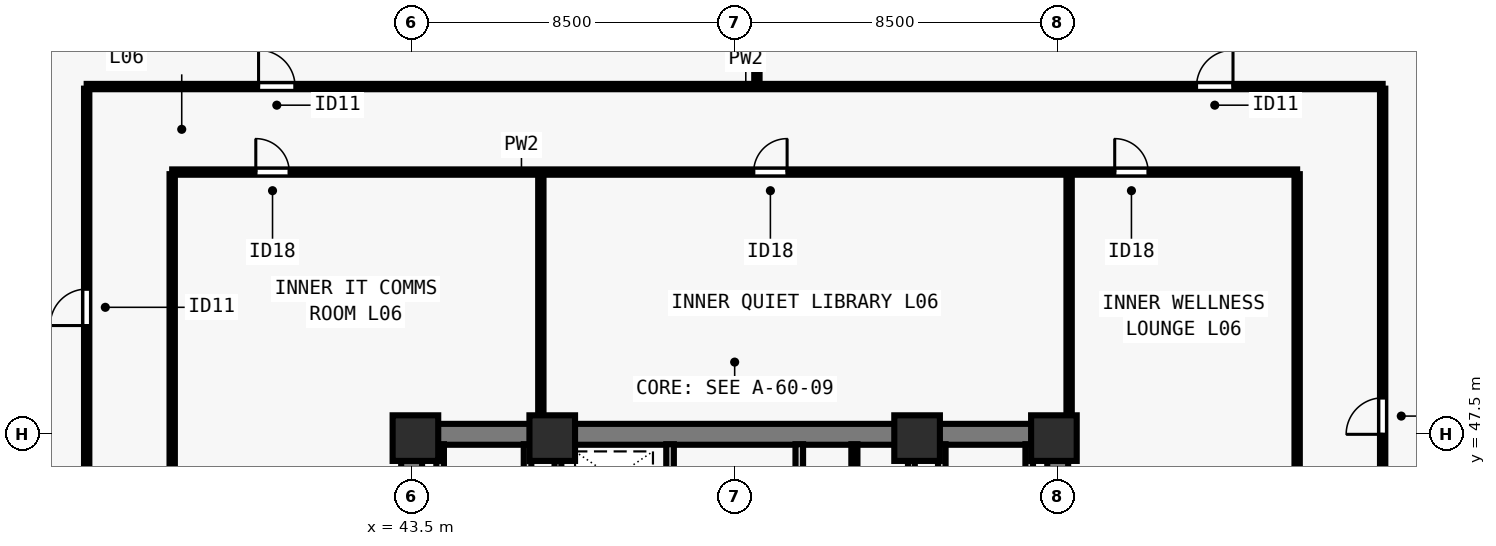
"""IFC4 building model, lengths in metres.
Left out: names, types, materials, properties, quantities, classifications, styles, units other than length and angle.
Written with IfcOpenShell. Run it as: python <this file> out.ifc"""

import sys

from ifc_helpers import new_model, si_unit, direction, frame, frame_2d, origin, origin_2d, place, context, subcontext, project, spatial, rectangle, extrude, element, fill, save


model = new_model("IFC4")
c1 = context("Model", 3, precision=1e-05, world=origin(), true_north=direction((0.0, 1.0)))
c2 = subcontext(c1, "Body", "Model", "MODEL_VIEW")
j1 = project(units=[si_unit("LENGTHUNIT", "METRE"), si_unit("PLANEANGLEUNIT", "RADIAN")], contexts=[c1])
p1 = place(None, origin())
s1 = spatial("IfcSite", under=j1, at=p1, CompositionType="ELEMENT")
p2 = place(p1, origin())
s2 = spatial("IfcBuilding", under=s1, at=p2, CompositionType="ELEMENT")
p3 = place(p2, frame((0.0, 0.0, 27.0)))
s3 = spatial("IfcBuildingStorey", under=s2, at=p3, CompositionType="ELEMENT", Elevation=27.0)
for number, where, z_axis, x_axis in (
    (1, (43.6, 47.4, 0.0), (0.0, 0.0, 1.0), (1.0, 0.0, 0.0)),
    (2, (47.2, 47.4, 0.0), (0.0, 0.0, 1.0), (1.0, 0.0, 0.0)),
    (3, (56.8, 47.4, 0.0), (0.0, 0.0, 1.0), (1.0, 0.0, 0.0)),
    (4, (60.4, 47.4, 0.0), (0.0, 0.0, 1.0), (1.0, 0.0, 0.0)),
):
    element("IfcColumn", number, at=place(p3, frame(where, z_axis=z_axis, x_axis=x_axis)), inside=s3, PredefinedType="COLUMN", context=c2, shape_type="SweptSolid", body=[
        extrude(rectangle(XDim=1.2, YDim=1.2, at=origin_2d()), origin(), (0.0, 0.0, 1.0), 3.5),
    ])
p4 = place(p3, frame((43.225, 47.5, 0.0), z_axis=(0.0, 0.0, 1.0), x_axis=(1.0, 0.0, 0.0)))
e5 = element("IfcWall", 5, at=p4, inside=s3, PredefinedType="SHEAR", context=c2, shape_type="SweptSolid", body=[
    extrude(rectangle(XDim=17.55, YDim=0.55, at=frame_2d((8.775, 0.0))), origin(), (0.0, 0.0, 1.0), 3.28),
])
for number, where, z_axis, x_axis in (
    (6, (43.5, 40.8, 0.0), (0.0, 0.0, 1.0), (0.0, 1.0, 0.0)),
    (7, (60.5, 40.8, 0.0), (0.0, 0.0, 1.0), (0.0, 1.0, 0.0)),
):
    element("IfcWall", number, at=place(p3, frame(where, z_axis=z_axis, x_axis=x_axis)), inside=s3, PredefinedType="SHEAR", context=c2, shape_type="SweptSolid", body=[
        extrude(rectangle(XDim=6.435, YDim=0.55, at=frame_2d((3.218, 0.0))), origin(), (0.0, 0.0, 1.0), 3.28),
    ])
p5 = place(p3, frame((50.3, 40.585, 0.0), z_axis=(0.0, 0.0, 1.0), x_axis=(0.0, 1.0, 0.0)))
e8 = element("IfcWall", 8, at=p5, inside=s3, PredefinedType="SOLIDWALL", context=c2, shape_type="SweptSolid", body=[
    extrude(rectangle(XDim=6.655, YDim=0.2, at=frame_2d((3.328, 0.0))), origin(), (0.0, 0.0, 1.0), 3.28),
])
p6 = place(p5, frame((5.065, 0.0, 0.0)))
e9 = element("IfcOpeningElement", 9, at=p6, cuts=e8, PredefinedType="OPENING", context=c2, shape_type="SweptSolid", body=[
    extrude(rectangle(XDim=0.8, YDim=2.08, at=frame_2d((0.4, 1.04))), frame((0.0, 0.11, 0.0), z_axis=(0.0, -1.0, 0.0), x_axis=(1.0, 0.0, 0.0)), (0.0, 0.0, 1.0), 0.22),
])
p7 = place(p3, frame((53.7, 40.585, 0.0), z_axis=(0.0, 0.0, 1.0), x_axis=(0.0, 1.0, 0.0)))
e10 = element("IfcWall", 10, at=p7, inside=s3, PredefinedType="SOLIDWALL", context=c2, shape_type="SweptSolid", body=[
    extrude(rectangle(XDim=6.655, YDim=0.2, at=frame_2d((3.328, 0.0))), origin(), (0.0, 0.0, 1.0), 3.28),
])
p8 = place(p7, frame((0.195, 0.0, 0.0)))
e11 = element("IfcOpeningElement", 11, at=p8, cuts=e10, PredefinedType="OPENING", context=c2, shape_type="SweptSolid", body=[
    extrude(rectangle(XDim=0.8, YDim=2.08, at=frame_2d((0.4, 1.04))), frame((0.0, 0.11, 0.0), z_axis=(0.0, -1.0, 0.0), x_axis=(1.0, 0.0, 0.0)), (0.0, 0.0, 1.0), 0.22),
])
p9 = place(p7, frame((4.265, 0.0, 0.0)))
e12 = element("IfcOpeningElement", 12, at=p9, cuts=e10, PredefinedType="OPENING", context=c2, shape_type="SweptSolid", body=[
    extrude(rectangle(XDim=0.95, YDim=2.12, at=frame_2d((0.475, 1.06))), frame((0.0, 0.11, 0.0), z_axis=(0.0, -1.0, 0.0), x_axis=(1.0, 0.0, 0.0)), (0.0, 0.0, 1.0), 0.22),
])
for number, where, z_axis, x_axis in (
    (13, (46.55, 43.735, 0.0), (0.0, 0.0, 1.0), (0.0, 1.0, 0.0)),
    (14, (44.25, 43.735, 0.0), (0.0, 0.0, 1.0), (0.0, 1.0, 0.0)),
    (15, (57.45, 43.735, 0.0), (0.0, 0.0, 1.0), (0.0, 1.0, 0.0)),
    (16, (59.75, 43.735, 0.0), (0.0, 0.0, 1.0), (0.0, 1.0, 0.0)),
):
    element("IfcWall", number, at=place(p3, frame(where, z_axis=z_axis, x_axis=x_axis)), inside=s3, PredefinedType="SOLIDWALL", context=c2, shape_type="SweptSolid", body=[
        extrude(rectangle(XDim=3.505, YDim=0.2, at=frame_2d((1.752, 0.0))), origin(), (0.0, 0.0, 1.0), 3.28),
    ])
for number, where, z_axis, x_axis in (
    (17, (47.35, 43.735, 0.0), (0.0, 0.0, 1.0), (0.0, 1.0, 0.0)),
    (18, (56.65, 43.735, 0.0), (0.0, 0.0, 1.0), (0.0, 1.0, 0.0)),
):
    element("IfcWall", number, at=place(p3, frame(where, z_axis=z_axis, x_axis=x_axis)), inside=s3, PredefinedType="SOLIDWALL", context=c2, shape_type="SweptSolid", body=[
        extrude(rectangle(XDim=3.505, YDim=0.18, at=frame_2d((1.752, 0.0))), origin(), (0.0, 0.0, 1.0), 3.28),
    ])
p10 = place(p3, frame((55.15, 44.195, 0.0), z_axis=(0.0, 0.0, 1.0), x_axis=(0.0, 1.0, 0.0)))
e19 = element("IfcWall", 19, at=p10, inside=s3, PredefinedType="PARTITIONING", context=c2, shape_type="SweptSolid", body=[
    extrude(rectangle(XDim=3.045, YDim=0.16, at=frame_2d((1.522, 0.0))), origin(), (0.0, 0.0, 1.0), 3.28),
])
p11 = place(p10, frame((1.025, 0.0, 0.0)))
e20 = element("IfcOpeningElement", 20, at=p11, cuts=e19, PredefinedType="OPENING", context=c2, shape_type="SweptSolid", body=[
    extrude(rectangle(XDim=0.8, YDim=2.1, at=frame_2d((0.4, 1.05))), frame((0.0, 0.09, 0.0), z_axis=(0.0, -1.0, 0.0), x_axis=(1.0, 0.0, 0.0)), (0.0, 0.0, 1.0), 0.18),
])
p12 = place(p3, frame((34.95, 56.65, 0.0), z_axis=(0.0, 0.0, 1.0), x_axis=(1.0, 0.0, 0.0)))
e21 = element("IfcWall", 21, at=p12, inside=s3, PredefinedType="PARTITIONING", context=c2, shape_type="SweptSolid", body=[
    extrude(rectangle(XDim=34.1, YDim=0.14, at=frame_2d((17.05, 0.0))), origin(), (0.0, 0.0, 1.0), 3.28),
])
p13 = place(p12, frame((4.522, 0.0, 0.0)))
e22 = element("IfcOpeningElement", 22, at=p13, cuts=e21, PredefinedType="OPENING", context=c2, shape_type="SweptSolid", body=[
    extrude(rectangle(XDim=0.96, YDim=2.12, at=frame_2d((0.48, 1.06))), frame((0.0, 0.08, 0.0), z_axis=(0.0, -1.0, 0.0), x_axis=(1.0, 0.0, 0.0)), (0.0, 0.0, 1.0), 0.16),
])
p14 = place(p12, frame((29.202, 0.0, 0.0)))
e23 = element("IfcOpeningElement", 23, at=p14, cuts=e21, PredefinedType="OPENING", context=c2, shape_type="SweptSolid", body=[
    extrude(rectangle(XDim=0.96, YDim=2.12, at=frame_2d((0.48, 1.06))), frame((0.0, 0.08, 0.0), z_axis=(0.0, -1.0, 0.0), x_axis=(1.0, 0.0, 0.0)), (0.0, 0.0, 1.0), 0.16),
])
p15 = place(p3, frame((34.95, 21.405, 0.0), z_axis=(0.0, 0.0, 1.0), x_axis=(0.0, 1.0, 0.0)))
e24 = element("IfcWall", 24, at=p15, inside=s3, PredefinedType="PARTITIONING", context=c2, shape_type="SweptSolid", body=[
    extrude(rectangle(XDim=35.19, YDim=0.14, at=frame_2d((17.595, 0.0))), origin(), (0.0, 0.0, 1.0), 3.28),
])
p16 = place(p15, frame((5.21, 0.0, 0.0)))
e25 = element("IfcOpeningElement", 25, at=p16, cuts=e24, PredefinedType="OPENING", context=c2, shape_type="SweptSolid", body=[
    extrude(rectangle(XDim=0.96, YDim=2.12, at=frame_2d((0.48, 1.06))), frame((0.0, 0.08, 0.0), z_axis=(0.0, -1.0, 0.0), x_axis=(1.0, 0.0, 0.0)), (0.0, 0.0, 1.0), 0.16),
])
p17 = place(p15, frame((17.052, 0.0, 0.0)))
e26 = element("IfcOpeningElement", 26, at=p17, cuts=e24, PredefinedType="OPENING", context=c2, shape_type="SweptSolid", body=[
    extrude(rectangle(XDim=0.96, YDim=2.12, at=frame_2d((0.48, 1.06))), frame((0.0, 0.08, 0.0), z_axis=(0.0, -1.0, 0.0), x_axis=(1.0, 0.0, 0.0)), (0.0, 0.0, 1.0), 0.16),
])
p18 = place(p15, frame((28.957, 0.0, 0.0)))
e27 = element("IfcOpeningElement", 27, at=p18, cuts=e24, PredefinedType="OPENING", context=c2, shape_type="SweptSolid", body=[
    extrude(rectangle(XDim=0.96, YDim=2.12, at=frame_2d((0.48, 1.06))), frame((0.0, 0.08, 0.0), z_axis=(0.0, -1.0, 0.0), x_axis=(1.0, 0.0, 0.0)), (0.0, 0.0, 1.0), 0.16),
])
p19 = place(p3, frame((69.05, 21.405, 0.0), z_axis=(0.0, 0.0, 1.0), x_axis=(0.0, 1.0, 0.0)))
e28 = element("IfcWall", 28, at=p19, inside=s3, PredefinedType="PARTITIONING", context=c2, shape_type="SweptSolid", body=[
    extrude(rectangle(XDim=35.19, YDim=0.14, at=frame_2d((17.595, 0.0))), origin(), (0.0, 0.0, 1.0), 3.28),
])
p20 = place(p19, frame((8.545, 0.0, 0.0)))
e29 = element("IfcOpeningElement", 29, at=p20, cuts=e28, PredefinedType="OPENING", context=c2, shape_type="SweptSolid", body=[
    extrude(rectangle(XDim=0.96, YDim=2.12, at=frame_2d((0.48, 1.06))), frame((0.0, 0.08, 0.0), z_axis=(0.0, -1.0, 0.0), x_axis=(1.0, 0.0, 0.0)), (0.0, 0.0, 1.0), 0.16),
])
p21 = place(p19, frame((26.095, 0.0, 0.0)))
e30 = element("IfcOpeningElement", 30, at=p21, cuts=e28, PredefinedType="OPENING", context=c2, shape_type="SweptSolid", body=[
    extrude(rectangle(XDim=0.96, YDim=2.12, at=frame_2d((0.48, 1.06))), frame((0.0, 0.08, 0.0), z_axis=(0.0, -1.0, 0.0), x_axis=(1.0, 0.0, 0.0)), (0.0, 0.0, 1.0), 0.16),
])
p22 = place(p3, frame((37.2, 54.4, 0.0), z_axis=(0.0, 0.0, 1.0), x_axis=(1.0, 0.0, 0.0)))
e31 = element("IfcWall", 31, at=p22, inside=s3, PredefinedType="PARTITIONING", context=c2, shape_type="SweptSolid", body=[
    extrude(rectangle(XDim=29.6, YDim=0.14, at=frame_2d((14.8, 0.0))), origin(), (0.0, 0.0, 1.0), 3.28),
])
p23 = place(p22, frame((2.2, 0.0, 0.0)))
e32 = element("IfcOpeningElement", 32, at=p23, cuts=e31, PredefinedType="OPENING", context=c2, shape_type="SweptSolid", body=[
    extrude(rectangle(XDim=0.88, YDim=2.1, at=frame_2d((0.44, 1.05))), frame((0.0, 0.08, 0.0), z_axis=(0.0, -1.0, 0.0), x_axis=(1.0, 0.0, 0.0)), (0.0, 0.0, 1.0), 0.16),
])
p24 = place(p22, frame((15.3, 0.0, 0.0)))
e33 = element("IfcOpeningElement", 33, at=p24, cuts=e31, PredefinedType="OPENING", context=c2, shape_type="SweptSolid", body=[
    extrude(rectangle(XDim=0.88, YDim=2.1, at=frame_2d((0.44, 1.05))), frame((0.0, 0.08, 0.0), z_axis=(0.0, -1.0, 0.0), x_axis=(1.0, 0.0, 0.0)), (0.0, 0.0, 1.0), 0.16),
])
p25 = place(p22, frame((24.8, 0.0, 0.0)))
e34 = element("IfcOpeningElement", 34, at=p25, cuts=e31, PredefinedType="OPENING", context=c2, shape_type="SweptSolid", body=[
    extrude(rectangle(XDim=0.88, YDim=2.1, at=frame_2d((0.44, 1.05))), frame((0.0, 0.08, 0.0), z_axis=(0.0, -1.0, 0.0), x_axis=(1.0, 0.0, 0.0)), (0.0, 0.0, 1.0), 0.16),
])
p26 = place(p3, frame((37.2, 40.8, 0.0), z_axis=(0.0, 0.0, 1.0), x_axis=(0.0, 1.0, 0.0)))
e35 = element("IfcWall", 35, at=p26, inside=s3, PredefinedType="PARTITIONING", context=c2, shape_type="SweptSolid", body=[
    extrude(rectangle(XDim=13.545, YDim=0.14, at=frame_2d((6.772, 0.0))), origin(), (0.0, 0.0, 1.0), 3.28),
])
p27 = place(p26, frame((2.5, 0.0, 0.0)))
e36 = element("IfcOpeningElement", 36, at=p27, cuts=e35, PredefinedType="OPENING", context=c2, shape_type="SweptSolid", body=[
    extrude(rectangle(XDim=0.88, YDim=2.1, at=frame_2d((0.44, 1.05))), frame((0.0, 0.08, 0.0), z_axis=(0.0, -1.0, 0.0), x_axis=(1.0, 0.0, 0.0)), (0.0, 0.0, 1.0), 0.16),
])
p28 = place(p3, frame((66.8, 40.8, 0.0), z_axis=(0.0, 0.0, 1.0), x_axis=(0.0, 1.0, 0.0)))
e37 = element("IfcWall", 37, at=p28, inside=s3, PredefinedType="PARTITIONING", context=c2, shape_type="SweptSolid", body=[
    extrude(rectangle(XDim=13.545, YDim=0.14, at=frame_2d((6.772, 0.0))), origin(), (0.0, 0.0, 1.0), 3.28),
])
p29 = place(p28, frame((2.5, 0.0, 0.0)))
e38 = element("IfcOpeningElement", 38, at=p29, cuts=e37, PredefinedType="OPENING", context=c2, shape_type="SweptSolid", body=[
    extrude(rectangle(XDim=0.88, YDim=2.1, at=frame_2d((0.44, 1.05))), frame((0.0, 0.08, 0.0), z_axis=(0.0, -1.0, 0.0), x_axis=(1.0, 0.0, 0.0)), (0.0, 0.0, 1.0), 0.16),
])
p30 = place(p3, frame((46.9, 47.76, 0.0), z_axis=(0.0, 0.0, 1.0), x_axis=(0.0, 1.0, 0.0)))
e39 = element("IfcWall", 39, at=p30, inside=s3, PredefinedType="PARTITIONING", context=c2, shape_type="SweptSolid", body=[
    extrude(rectangle(XDim=6.585, YDim=0.14, at=frame_2d((3.292, 0.0))), origin(), (0.0, 0.0, 1.0), 3.28),
])
p31 = place(p3, frame((60.8, 47.76, 0.0), z_axis=(0.0, 0.0, 1.0), x_axis=(0.0, 1.0, 0.0)))
e40 = element("IfcWall", 40, at=p31, inside=s3, PredefinedType="PARTITIONING", context=c2, shape_type="SweptSolid", body=[
    extrude(rectangle(XDim=6.585, YDim=0.14, at=frame_2d((3.292, 0.0))), origin(), (0.0, 0.0, 1.0), 2.439),
])
p32 = place(p3, frame((52.585, 56.75, 0.0), z_axis=(0.0, 0.0, 1.0), x_axis=(0.0, 1.0, 0.0)))
e41 = element("IfcWall", 41, at=p32, inside=s3, PredefinedType="PARTITIONING", context=c2, shape_type="SweptSolid", body=[
    extrude(rectangle(XDim=7.33, YDim=0.14, at=frame_2d((3.665, 0.0))), origin(), (0.0, 0.0, 1.0), 2.849),
])
p33 = place(p23, origin())
e42 = element("IfcDoor", 42, at=p33, inside=s3, OperationType="SINGLE_SWING_LEFT", PredefinedType="DOOR", context=c2, shape_type="SweptSolid", body=[
    extrude(rectangle(XDim=0.88, YDim=2.1, at=frame_2d((0.44, 1.05))), frame((0.0, 0.025, 0.0), z_axis=(0.0, -1.0, 0.0), x_axis=(1.0, 0.0, 0.0)), (0.0, 0.0, 1.0), 0.05),
])
fill(e32, e42)
p34 = place(p24, origin())
e43 = element("IfcDoor", 43, at=p34, inside=s3, OperationType="SINGLE_SWING_RIGHT", PredefinedType="DOOR", context=c2, shape_type="SweptSolid", body=[
    extrude(rectangle(XDim=0.88, YDim=2.1, at=frame_2d((0.44, 1.05))), frame((0.0, 0.025, 0.0), z_axis=(0.0, -1.0, 0.0), x_axis=(1.0, 0.0, 0.0)), (0.0, 0.0, 1.0), 0.05),
])
fill(e33, e43)
p35 = place(p25, origin())
e44 = element("IfcDoor", 44, at=p35, inside=s3, OperationType="SINGLE_SWING_LEFT", PredefinedType="DOOR", context=c2, shape_type="SweptSolid", body=[
    extrude(rectangle(XDim=0.88, YDim=2.1, at=frame_2d((0.44, 1.05))), frame((0.0, 0.025, 0.0), z_axis=(0.0, -1.0, 0.0), x_axis=(1.0, 0.0, 0.0)), (0.0, 0.0, 1.0), 0.05),
])
fill(e34, e44)
p36 = place(p13, origin())
e45 = element("IfcDoor", 45, at=p36, inside=s3, OperationType="SINGLE_SWING_LEFT", PredefinedType="DOOR", context=c2, shape_type="SweptSolid", body=[
    extrude(rectangle(XDim=0.96, YDim=2.12, at=frame_2d((0.48, 1.06))), frame((0.0, 0.025, 0.0), z_axis=(0.0, -1.0, 0.0), x_axis=(1.0, 0.0, 0.0)), (0.0, 0.0, 1.0), 0.05),
])
fill(e22, e45)
p37 = place(p14, origin())
e46 = element("IfcDoor", 46, at=p37, inside=s3, OperationType="SINGLE_SWING_RIGHT", PredefinedType="DOOR", context=c2, shape_type="SweptSolid", body=[
    extrude(rectangle(XDim=0.96, YDim=2.12, at=frame_2d((0.48, 1.06))), frame((0.0, 0.025, 0.0), z_axis=(0.0, -1.0, 0.0), x_axis=(1.0, 0.0, 0.0)), (0.0, 0.0, 1.0), 0.05),
])
fill(e23, e46)
p38 = place(p18, origin())
e47 = element("IfcDoor", 47, at=p38, inside=s3, OperationType="SINGLE_SWING_LEFT", PredefinedType="DOOR", context=c2, shape_type="SweptSolid", body=[
    extrude(rectangle(XDim=0.96, YDim=2.12, at=frame_2d((0.48, 1.06))), frame((0.0, 0.025, 0.0), z_axis=(0.0, -1.0, 0.0), x_axis=(1.0, 0.0, 0.0)), (0.0, 0.0, 1.0), 0.05),
])
fill(e27, e47)
p39 = place(p21, origin())
e48 = element("IfcDoor", 48, at=p39, inside=s3, OperationType="SINGLE_SWING_LEFT", PredefinedType="DOOR", context=c2, shape_type="SweptSolid", body=[
    extrude(rectangle(XDim=0.96, YDim=2.12, at=frame_2d((0.48, 1.06))), frame((0.0, 0.025, 0.0), z_axis=(0.0, -1.0, 0.0), x_axis=(1.0, 0.0, 0.0)), (0.0, 0.0, 1.0), 0.05),
])
fill(e30, e48)
save(model, sys.argv[1])
